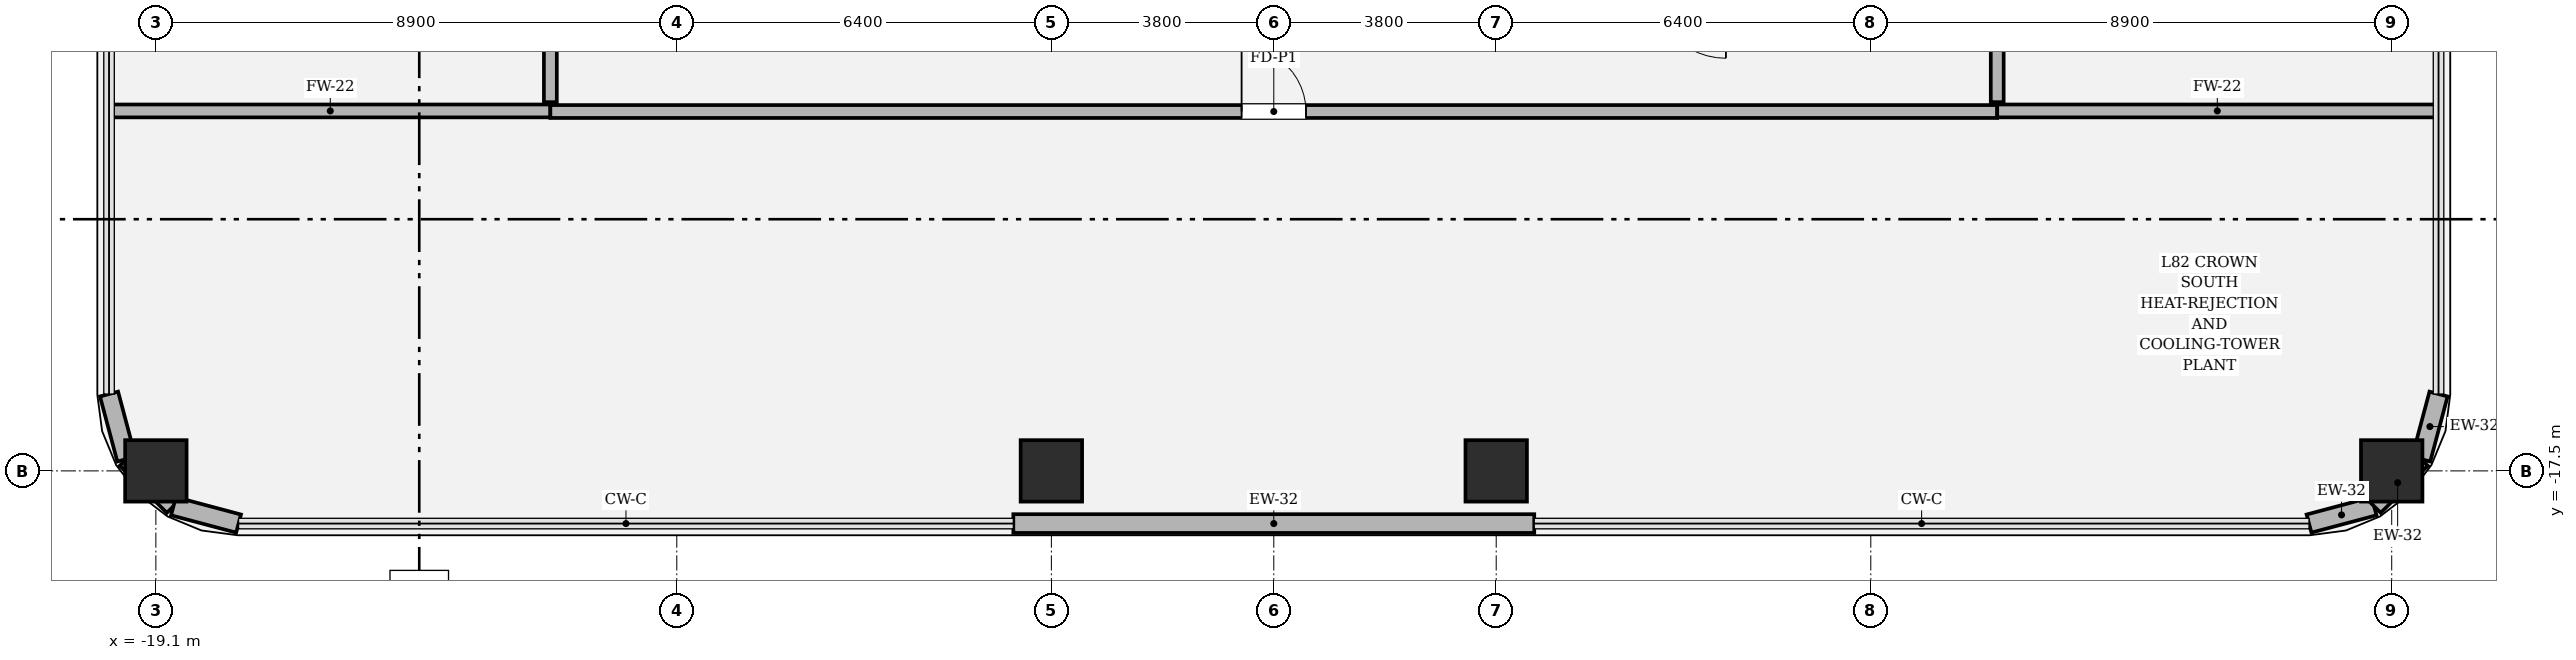
"""IFC4 building model, lengths in metres.
Left out: names, types, materials, properties, quantities, classifications, styles, units other than length and angle.
Written with IfcOpenShell. Run it as: python <this file> out.ifc"""

import sys

from ifc_helpers import new_model, si_unit, direction, frame, frame_2d, origin, origin_2d, place, context, subcontext, project, spatial, rectangle, hollow_rectangle, extrude, element, fill, save


model = new_model("IFC4")
c1 = context("Model", 3, precision=1e-05, world=origin(), true_north=direction((0.0, 1.0)))
c2 = subcontext(c1, "Body", "Model", "MODEL_VIEW")
j1 = project(units=[si_unit("LENGTHUNIT", "METRE"), si_unit("PLANEANGLEUNIT", "RADIAN")], contexts=[c1])
p1 = place(None, origin())
s1 = spatial("IfcSite", under=j1, at=p1, CompositionType="ELEMENT")
p2 = place(p1, origin())
s2 = spatial("IfcBuilding", under=s1, at=p2, CompositionType="ELEMENT")
p3 = place(p2, frame((0.0, 0.0, 348.3)))
s3 = spatial("IfcBuildingStorey", under=s2, at=p3, CompositionType="ELEMENT", Elevation=348.3)
for number, where, z_axis, x_axis in (
    (1, (-19.1, -17.5, 0.0), (0.0, 0.0, 1.0), (1.0, 0.0, 0.0)),
    (2, (-3.8, -17.5, 0.0), (0.0, 0.0, 1.0), (1.0, 0.0, 0.0)),
    (3, (3.8, -17.5, 0.0), (0.0, 0.0, 1.0), (1.0, 0.0, 0.0)),
    (4, (19.1, -17.5, 0.0), (0.0, 0.0, 1.0), (1.0, 0.0, 0.0)),
):
    element("IfcColumn", number, at=place(p3, frame(where, z_axis=z_axis, x_axis=x_axis)), inside=s3, PredefinedType="COLUMN", context=c2, shape_type="SweptSolid", body=[
        extrude(hollow_rectangle(XDim=1.05, YDim=1.05, WallThickness=0.03, at=origin_2d()), origin(), (0.0, 0.0, 1.0), 4.5),
    ])
p4 = place(p3, frame((-4.45, -18.4, 0.0), z_axis=(0.0, 0.0, 1.0), x_axis=(1.0, 0.0, 0.0)))
e5 = element("IfcWall", 5, at=p4, inside=s3, PredefinedType="SOLIDWALL", context=c2, shape_type="SweptSolid", body=[
    extrude(rectangle(XDim=8.9, YDim=0.32, at=frame_2d((4.45, 0.0))), origin(), (0.0, 0.0, 1.0), 4.22),
])
p5 = place(p3, frame((17.687, -18.4, 0.0), z_axis=(0.0, 0.0, 1.0), x_axis=(0.966322910406, 0.257332533551, 0.0)))
e6 = element("IfcWall", 6, at=p5, inside=s3, PredefinedType="SOLIDWALL", context=c2, shape_type="SweptSolid", body=[
    extrude(rectangle(XDim=1.151, YDim=0.32, at=frame_2d((0.575, 0.0))), origin(), (0.0, 0.0, 1.0), 4.22),
])
p6 = place(p3, frame((18.799, -18.104, 0.0), z_axis=(0.0, 0.0, 1.0), x_axis=(0.707106781187, 0.707106781187, 0.0)))
e7 = element("IfcWall", 7, at=p6, inside=s3, PredefinedType="SOLIDWALL", context=c2, shape_type="SweptSolid", body=[
    extrude(rectangle(XDim=1.138, YDim=0.32, at=frame_2d((0.569, 0.0))), origin(), (0.0, 0.0, 1.0), 3.894),
])
for number, where, z_axis, x_axis in (
    (8, (19.604, -17.299, 0.0), (0.0, 0.0, 1.0), (0.257, 0.966, 0.0)),
    (9, (-19.9, -16.187, 0.0), (0.0, 0.0, 1.0), (0.257, -0.966, 0.0)),
):
    element("IfcWall", number, at=place(p3, frame(where, z_axis=z_axis, x_axis=x_axis)), inside=s3, PredefinedType="SOLIDWALL", context=c2, shape_type="SweptSolid", body=[
        extrude(rectangle(XDim=1.151, YDim=0.32, at=frame_2d((0.575, 0.0))), origin(), (0.0, 0.0, 1.0), 4.22),
    ])
p7 = place(p3, frame((-19.604, -17.299, 0.0), z_axis=(0.0, 0.0, 1.0), x_axis=(0.707106781187, -0.707106781187, 0.0)))
e10 = element("IfcWall", 10, at=p7, inside=s3, PredefinedType="SOLIDWALL", context=c2, shape_type="SweptSolid", body=[
    extrude(rectangle(XDim=1.138, YDim=0.32, at=frame_2d((0.569, 0.0))), origin(), (0.0, 0.0, 1.0), 3.894),
])
p8 = place(p3, frame((-18.799, -18.104, 0.0), z_axis=(0.0, 0.0, 1.0), x_axis=(0.966322910406, -0.257332533551, 0.0)))
e11 = element("IfcWall", 11, at=p8, inside=s3, PredefinedType="SOLIDWALL", context=c2, shape_type="SweptSolid", body=[
    extrude(rectangle(XDim=1.151, YDim=0.32, at=frame_2d((0.575, 0.0))), origin(), (0.0, 0.0, 1.0), 4.22),
])
p9 = place(p3, frame((-19.88, -11.35, 0.0), z_axis=(0.0, 0.0, 1.0), x_axis=(1.0, 0.0, 0.0)))
e12 = element("IfcWall", 12, at=p9, inside=s3, PredefinedType="SOLIDWALL", context=c2, shape_type="SweptSolid", body=[
    extrude(rectangle(XDim=7.52, YDim=0.22, at=frame_2d((3.76, 0.0))), origin(), (0.0, 0.0, 1.0), 2.934),
])
p10 = place(p3, frame((-12.36, -11.36, 0.0), z_axis=(0.0, 0.0, 1.0), x_axis=(1.0, 0.0, 0.0)))
e13 = element("IfcWall", 13, at=p10, inside=s3, PredefinedType="SOLIDWALL", context=c2, shape_type="SweptSolid", body=[
    extrude(rectangle(XDim=24.72, YDim=0.22, at=frame_2d((12.36, 0.0))), origin(), (0.0, 0.0, 1.0), 2.934),
])
p11 = place(p10, frame((11.81, 0.0, 0.0)))
e14 = element("IfcOpeningElement", 14, at=p11, cuts=e13, PredefinedType="OPENING", context=c2, shape_type="SweptSolid", body=[
    extrude(rectangle(XDim=1.1, YDim=2.2, at=frame_2d((0.55, 1.1))), frame((0.0, 0.12, 0.0), z_axis=(0.0, -1.0, 0.0), x_axis=(1.0, 0.0, 0.0)), (0.0, 0.0, 1.0), 0.24),
])
p12 = place(p3, frame((12.36, -11.35, 0.0), z_axis=(0.0, 0.0, 1.0), x_axis=(1.0, 0.0, 0.0)))
e15 = element("IfcWall", 15, at=p12, inside=s3, PredefinedType="SOLIDWALL", context=c2, shape_type="SweptSolid", body=[
    extrude(rectangle(XDim=7.52, YDim=0.22, at=frame_2d((3.76, 0.0))), origin(), (0.0, 0.0, 1.0), 2.934),
])
p13 = place(p3, frame((-12.36, 11.2, 0.0), z_axis=(0.0, 0.0, 1.0), x_axis=(0.0, -1.0, 0.0)))
e16 = element("IfcWall", 16, at=p13, inside=s3, PredefinedType="SOLIDWALL", context=c2, shape_type="SweptSolid", body=[
    extrude(rectangle(XDim=22.4, YDim=0.22, at=frame_2d((11.2, 0.0))), origin(), (0.0, 0.0, 1.0), 2.934),
])
p14 = place(p13, frame((10.65, 0.0, 0.0)))
e17 = element("IfcOpeningElement", 17, at=p14, cuts=e16, PredefinedType="OPENING", context=c2, shape_type="SweptSolid", body=[
    extrude(rectangle(XDim=1.1, YDim=2.2, at=frame_2d((0.55, 1.1))), frame((0.0, 0.12, 0.0), z_axis=(0.0, -1.0, 0.0), x_axis=(1.0, 0.0, 0.0)), (0.0, 0.0, 1.0), 0.24),
])
p15 = place(p3, frame((12.36, -11.2, 0.0), z_axis=(0.0, 0.0, 1.0), x_axis=(0.0, 1.0, 0.0)))
e18 = element("IfcWall", 18, at=p15, inside=s3, PredefinedType="SOLIDWALL", context=c2, shape_type="SweptSolid", body=[
    extrude(rectangle(XDim=22.4, YDim=0.22, at=frame_2d((11.2, 0.0))), origin(), (0.0, 0.0, 1.0), 2.934),
])
p16 = place(p15, frame((10.65, 0.0, 0.0)))
e19 = element("IfcOpeningElement", 19, at=p16, cuts=e18, PredefinedType="OPENING", context=c2, shape_type="SweptSolid", body=[
    extrude(rectangle(XDim=1.1, YDim=2.2, at=frame_2d((0.55, 1.1))), frame((0.0, 0.12, 0.0), z_axis=(0.0, -1.0, 0.0), x_axis=(1.0, 0.0, 0.0)), (0.0, 0.0, 1.0), 0.24),
])
p17 = place(p11, origin())
e20 = element("IfcDoor", 20, at=p17, inside=s3, OperationType="SINGLE_SWING_LEFT", PredefinedType="DOOR", context=c2, shape_type="SweptSolid", body=[
    extrude(rectangle(XDim=1.1, YDim=2.2, at=frame_2d((0.55, 1.1))), frame((0.0, 0.025, 0.0), z_axis=(0.0, -1.0, 0.0), x_axis=(1.0, 0.0, 0.0)), (0.0, 0.0, 1.0), 0.05),
])
fill(e14, e20)
save(model, sys.argv[1])
